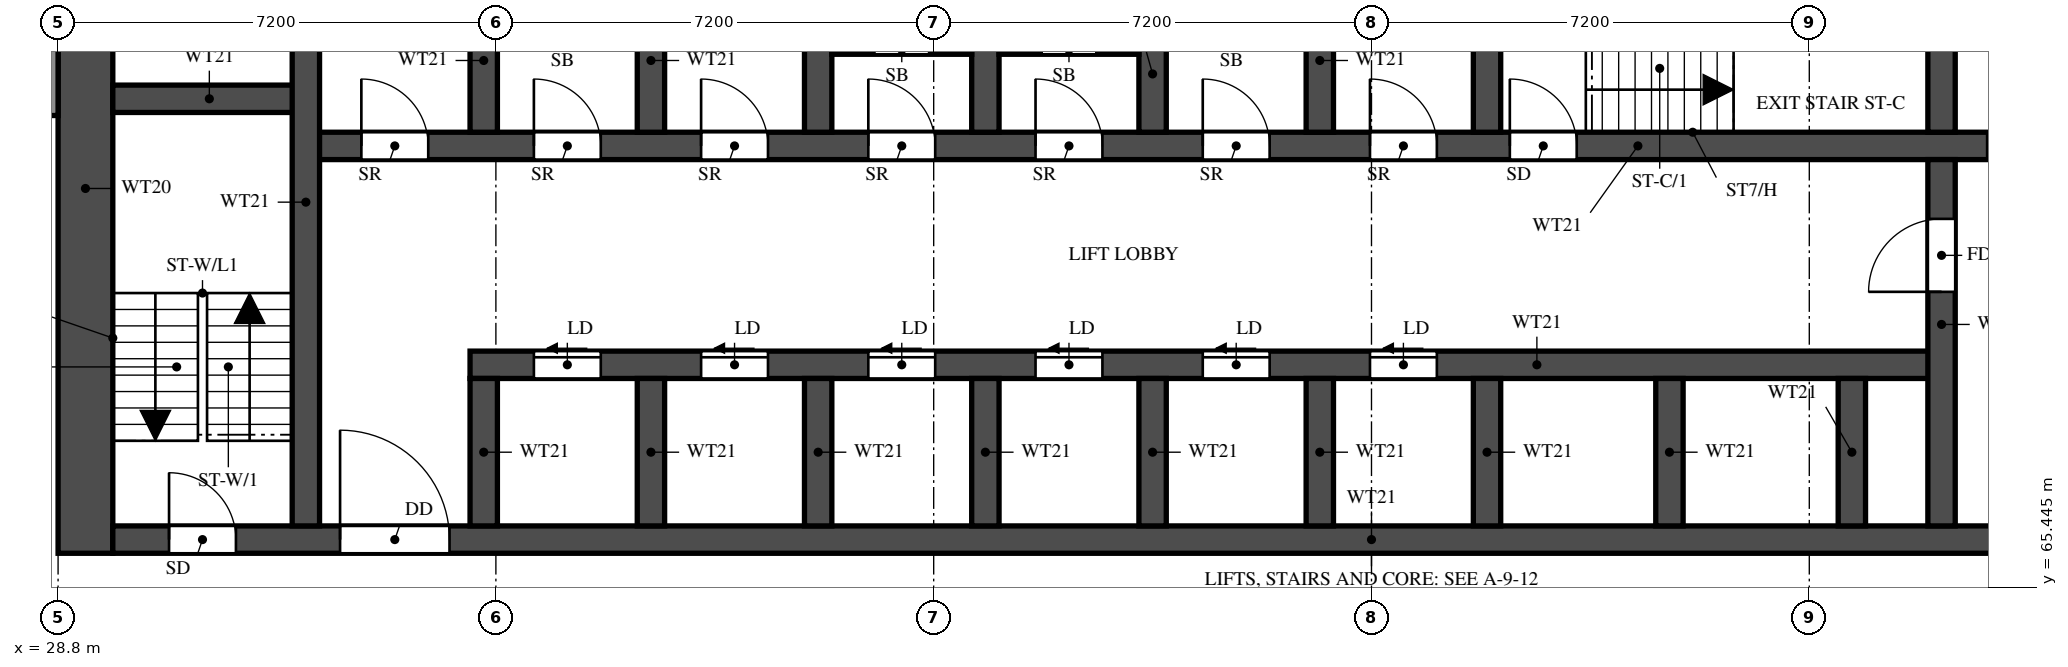
"""IFC4 building model, lengths in metres.
Left out: names, types, materials, properties, quantities, classifications, styles, units other than length and angle.
Written with IfcOpenShell. Run it as: python <this file> out.ifc"""

import sys

from ifc_helpers import new_model, si_unit, direction, frame, frame_2d, origin, place, context, subcontext, project, spatial, rectangle, extrude, element, fill, save


model = new_model("IFC4")
c1 = context("Model", 3, precision=1e-05, world=origin(), true_north=direction((0.0, 1.0)))
c2 = subcontext(c1, "Body", "Model", "MODEL_VIEW")
j1 = project(units=[si_unit("LENGTHUNIT", "METRE"), si_unit("PLANEANGLEUNIT", "RADIAN")], contexts=[c1])
p1 = place(None, origin())
s1 = spatial("IfcSite", under=j1, at=p1, CompositionType="ELEMENT")
p2 = place(p1, origin())
s2 = spatial("IfcBuilding", under=s1, at=p2, CompositionType="ELEMENT")
p3 = place(p2, frame((0.0, 0.0, 72.5)))
s3 = spatial("IfcBuildingStorey", under=s2, at=p3, CompositionType="ELEMENT", Elevation=72.5)
p4 = place(p3, frame((29.25, 66.0, 0.0), z_axis=(0.0, 0.0, 1.0), x_axis=(0.0, 1.0, 0.0)))
e1 = element("IfcWall", 1, at=p4, inside=s3, PredefinedType="SHEAR", context=c2, shape_type="SweptSolid", body=[
    extrude(rectangle(XDim=12.0, YDim=0.9, at=frame_2d((6.0, 0.0))), origin(), (0.0, 0.0, 1.0), 3.18),
])
p5 = place(p3, frame((29.7, 66.225, 0.0), z_axis=(0.0, 0.0, 1.0), x_axis=(1.0, 0.0, 0.0)))
e2 = element("IfcWall", 2, at=p5, inside=s3, PredefinedType="SHEAR", context=c2, shape_type="SweptSolid", body=[
    extrude(rectangle(XDim=41.4, YDim=0.45, at=frame_2d((20.7, 0.0))), origin(), (0.0, 0.0, 1.0), 3.18),
])
p6 = place(p5, frame((0.925, 0.0, 0.0)))
e3 = element("IfcOpeningElement", 3, at=p6, cuts=e2, PredefinedType="OPENING", context=c2, shape_type="SweptSolid", body=[
    extrude(rectangle(XDim=1.1, YDim=2.1, at=frame_2d((0.55, 1.05))), frame((0.0, 0.235, 0.0), z_axis=(0.0, -1.0, 0.0), x_axis=(1.0, 0.0, 0.0)), (0.0, 0.0, 1.0), 0.47),
])
p7 = place(p5, frame((3.738, 0.0, 0.0)))
e4 = element("IfcOpeningElement", 4, at=p7, cuts=e2, PredefinedType="OPENING", context=c2, shape_type="SweptSolid", body=[
    extrude(rectangle(XDim=1.8, YDim=2.1, at=frame_2d((0.9, 1.05))), frame((0.0, 0.235, 0.0), z_axis=(0.0, -1.0, 0.0), x_axis=(1.0, 0.0, 0.0)), (0.0, 0.0, 1.0), 0.47),
])
p8 = place(p3, frame((35.575, 69.1, 0.0), z_axis=(0.0, 0.0, 1.0), x_axis=(1.0, 0.0, 0.0)))
e5 = element("IfcWall", 5, at=p8, inside=s3, PredefinedType="SHEAR", context=c2, shape_type="SweptSolid", body=[
    extrude(rectangle(XDim=24.2, YDim=0.45, at=frame_2d((12.1, 0.0))), origin(), (0.0, 0.0, 1.0), 3.18),
])
p9 = place(p8, frame((1.05, 0.0, 0.0)))
e6 = element("IfcOpeningElement", 6, at=p9, cuts=e5, PredefinedType="OPENING", context=c2, shape_type="SweptSolid", body=[
    extrude(rectangle(XDim=1.1, YDim=2.1, at=frame_2d((0.55, 1.05))), frame((0.0, 0.235, 0.0), z_axis=(0.0, -1.0, 0.0), x_axis=(1.0, 0.0, 0.0)), (0.0, 0.0, 1.0), 0.47),
])
p10 = place(p8, frame((3.8, 0.0, 0.0)))
e7 = element("IfcOpeningElement", 7, at=p10, cuts=e5, PredefinedType="OPENING", context=c2, shape_type="SweptSolid", body=[
    extrude(rectangle(XDim=1.1, YDim=2.1, at=frame_2d((0.55, 1.05))), frame((0.0, 0.235, 0.0), z_axis=(0.0, -1.0, 0.0), x_axis=(1.0, 0.0, 0.0)), (0.0, 0.0, 1.0), 0.47),
])
p11 = place(p8, frame((6.55, 0.0, 0.0)))
e8 = element("IfcOpeningElement", 8, at=p11, cuts=e5, PredefinedType="OPENING", context=c2, shape_type="SweptSolid", body=[
    extrude(rectangle(XDim=1.1, YDim=2.1, at=frame_2d((0.55, 1.05))), frame((0.0, 0.235, 0.0), z_axis=(0.0, -1.0, 0.0), x_axis=(1.0, 0.0, 0.0)), (0.0, 0.0, 1.0), 0.47),
])
p12 = place(p8, frame((9.3, 0.0, 0.0)))
e9 = element("IfcOpeningElement", 9, at=p12, cuts=e5, PredefinedType="OPENING", context=c2, shape_type="SweptSolid", body=[
    extrude(rectangle(XDim=1.1, YDim=2.1, at=frame_2d((0.55, 1.05))), frame((0.0, 0.235, 0.0), z_axis=(0.0, -1.0, 0.0), x_axis=(1.0, 0.0, 0.0)), (0.0, 0.0, 1.0), 0.47),
])
p13 = place(p8, frame((12.05, 0.0, 0.0)))
e10 = element("IfcOpeningElement", 10, at=p13, cuts=e5, PredefinedType="OPENING", context=c2, shape_type="SweptSolid", body=[
    extrude(rectangle(XDim=1.1, YDim=2.1, at=frame_2d((0.55, 1.05))), frame((0.0, 0.235, 0.0), z_axis=(0.0, -1.0, 0.0), x_axis=(1.0, 0.0, 0.0)), (0.0, 0.0, 1.0), 0.47),
])
p14 = place(p8, frame((14.8, 0.0, 0.0)))
e11 = element("IfcOpeningElement", 11, at=p14, cuts=e5, PredefinedType="OPENING", context=c2, shape_type="SweptSolid", body=[
    extrude(rectangle(XDim=1.1, YDim=2.1, at=frame_2d((0.55, 1.05))), frame((0.0, 0.235, 0.0), z_axis=(0.0, -1.0, 0.0), x_axis=(1.0, 0.0, 0.0)), (0.0, 0.0, 1.0), 0.47),
])
p15 = place(p3, frame((32.875, 72.7, 0.0), z_axis=(0.0, 0.0, 1.0), x_axis=(1.0, 0.0, 0.0)))
e12 = element("IfcWall", 12, at=p15, inside=s3, PredefinedType="SHEAR", context=c2, shape_type="SweptSolid", body=[
    extrude(rectangle(XDim=35.05, YDim=0.45, at=frame_2d((17.525, 0.0))), origin(), (0.0, 0.0, 1.0), 3.18),
])
p16 = place(p15, frame((19.8, 0.0, 0.0)))
e13 = element("IfcOpeningElement", 13, at=p16, cuts=e12, PredefinedType="OPENING", context=c2, shape_type="SweptSolid", body=[
    extrude(rectangle(XDim=1.1, YDim=2.1, at=frame_2d((0.55, 1.05))), frame((0.0, 0.235, 0.0), z_axis=(0.0, -1.0, 0.0), x_axis=(1.0, 0.0, 0.0)), (0.0, 0.0, 1.0), 0.47),
])
p17 = place(p15, frame((27.65, 0.0, 0.0)))
e14 = element("IfcOpeningElement", 14, at=p17, cuts=e12, PredefinedType="OPENING", context=c2, shape_type="SweptSolid", body=[
    extrude(rectangle(XDim=1.1, YDim=2.1, at=frame_2d((0.55, 1.05))), frame((0.0, 0.235, 0.0), z_axis=(0.0, -1.0, 0.0), x_axis=(1.0, 0.0, 0.0)), (0.0, 0.0, 1.0), 0.47),
])
p18 = place(p15, frame((30.25, 0.0, 0.0)))
e15 = element("IfcOpeningElement", 15, at=p18, cuts=e12, PredefinedType="OPENING", context=c2, shape_type="SweptSolid", body=[
    extrude(rectangle(XDim=1.1, YDim=2.1, at=frame_2d((0.55, 1.05))), frame((0.0, 0.235, 0.0), z_axis=(0.0, -1.0, 0.0), x_axis=(1.0, 0.0, 0.0)), (0.0, 0.0, 1.0), 0.47),
])
p19 = place(p15, frame((3.75, 0.0, 0.0)))
e16 = element("IfcOpeningElement", 16, at=p19, cuts=e12, PredefinedType="OPENING", context=c2, shape_type="SweptSolid", body=[
    extrude(rectangle(XDim=1.1, YDim=2.1, at=frame_2d((0.55, 1.05))), frame((0.0, 0.235, 0.0), z_axis=(0.0, -1.0, 0.0), x_axis=(1.0, 0.0, 0.0)), (0.0, 0.0, 1.0), 0.47),
])
p20 = place(p15, frame((6.5, 0.0, 0.0)))
e17 = element("IfcOpeningElement", 17, at=p20, cuts=e12, PredefinedType="OPENING", context=c2, shape_type="SweptSolid", body=[
    extrude(rectangle(XDim=1.1, YDim=2.1, at=frame_2d((0.55, 1.05))), frame((0.0, 0.235, 0.0), z_axis=(0.0, -1.0, 0.0), x_axis=(1.0, 0.0, 0.0)), (0.0, 0.0, 1.0), 0.47),
])
p21 = place(p15, frame((9.25, 0.0, 0.0)))
e18 = element("IfcOpeningElement", 18, at=p21, cuts=e12, PredefinedType="OPENING", context=c2, shape_type="SweptSolid", body=[
    extrude(rectangle(XDim=1.1, YDim=2.1, at=frame_2d((0.55, 1.05))), frame((0.0, 0.235, 0.0), z_axis=(0.0, -1.0, 0.0), x_axis=(1.0, 0.0, 0.0)), (0.0, 0.0, 1.0), 0.47),
])
p22 = place(p15, frame((12.0, 0.0, 0.0)))
e19 = element("IfcOpeningElement", 19, at=p22, cuts=e12, PredefinedType="OPENING", context=c2, shape_type="SweptSolid", body=[
    extrude(rectangle(XDim=1.1, YDim=2.1, at=frame_2d((0.55, 1.05))), frame((0.0, 0.235, 0.0), z_axis=(0.0, -1.0, 0.0), x_axis=(1.0, 0.0, 0.0)), (0.0, 0.0, 1.0), 0.47),
])
p23 = place(p15, frame((14.75, 0.0, 0.0)))
e20 = element("IfcOpeningElement", 20, at=p23, cuts=e12, PredefinedType="OPENING", context=c2, shape_type="SweptSolid", body=[
    extrude(rectangle(XDim=1.1, YDim=2.1, at=frame_2d((0.55, 1.05))), frame((0.0, 0.235, 0.0), z_axis=(0.0, -1.0, 0.0), x_axis=(1.0, 0.0, 0.0)), (0.0, 0.0, 1.0), 0.47),
])
p24 = place(p15, frame((17.5, 0.0, 0.0)))
e21 = element("IfcOpeningElement", 21, at=p24, cuts=e12, PredefinedType="OPENING", context=c2, shape_type="SweptSolid", body=[
    extrude(rectangle(XDim=1.1, YDim=2.1, at=frame_2d((0.55, 1.05))), frame((0.0, 0.235, 0.0), z_axis=(0.0, -1.0, 0.0), x_axis=(1.0, 0.0, 0.0)), (0.0, 0.0, 1.0), 0.47),
])
p25 = place(p15, frame((0.913, 0.0, 0.0)))
e22 = element("IfcOpeningElement", 22, at=p25, cuts=e12, PredefinedType="OPENING", context=c2, shape_type="SweptSolid", body=[
    extrude(rectangle(XDim=1.1, YDim=2.1, at=frame_2d((0.55, 1.05))), frame((0.0, 0.235, 0.0), z_axis=(0.0, -1.0, 0.0), x_axis=(1.0, 0.0, 0.0)), (0.0, 0.0, 1.0), 0.47),
])
p26 = place(p3, frame((29.7, 73.475, 0.0), z_axis=(0.0, 0.0, 1.0), x_axis=(1.0, 0.0, 0.0)))
e23 = element("IfcWall", 23, at=p26, inside=s3, PredefinedType="SHEAR", context=c2, shape_type="SweptSolid", body=[
    extrude(rectangle(XDim=3.175, YDim=0.45, at=frame_2d((1.587, 0.0))), origin(), (0.0, 0.0, 1.0), 3.18),
])
p27 = place(p3, frame((32.875, 66.45, 0.0), z_axis=(0.0, 0.0, 1.0), x_axis=(0.0, 1.0, 0.0)))
e24 = element("IfcWall", 24, at=p27, inside=s3, PredefinedType="SHEAR", context=c2, shape_type="SweptSolid", body=[
    extrude(rectangle(XDim=10.65, YDim=0.45, at=frame_2d((5.325, 0.0))), origin(), (0.0, 0.0, 1.0), 3.18),
])
p28 = place(p3, frame((59.775, 66.45, 0.0), z_axis=(0.0, 0.0, 1.0), x_axis=(0.0, 1.0, 0.0)))
e25 = element("IfcWall", 25, at=p28, inside=s3, PredefinedType="SHEAR", context=c2, shape_type="SweptSolid", body=[
    extrude(rectangle(XDim=6.025, YDim=0.45, at=frame_2d((3.013, 0.0))), origin(), (0.0, 0.0, 1.0), 3.18),
])
p29 = place(p28, frame((3.85, 0.0, 0.0)))
e26 = element("IfcOpeningElement", 26, at=p29, cuts=e25, PredefinedType="OPENING", context=c2, shape_type="SweptSolid", body=[
    extrude(rectangle(XDim=1.2, YDim=2.1, at=frame_2d((0.6, 1.05))), frame((0.0, 0.235, 0.0), z_axis=(0.0, -1.0, 0.0), x_axis=(1.0, 0.0, 0.0)), (0.0, 0.0, 1.0), 0.47),
])
p30 = place(p3, frame((59.775, 72.925, 0.0), z_axis=(0.0, 0.0, 1.0), x_axis=(0.0, 1.0, 0.0)))
e27 = element("IfcWall", 27, at=p30, inside=s3, PredefinedType="SHEAR", context=c2, shape_type="SweptSolid", body=[
    extrude(rectangle(XDim=2.95, YDim=0.45, at=frame_2d((1.475, 0.0))), origin(), (0.0, 0.0, 1.0), 3.18),
])
for number, where, z_axis, x_axis in (
    (28, (35.8, 66.45, 0.0), (0.0, 0.0, 1.0), (0.0, 1.0, 0.0)),
    (29, (38.55, 66.45, 0.0), (0.0, 0.0, 1.0), (0.0, 1.0, 0.0)),
    (30, (41.3, 66.45, 0.0), (0.0, 0.0, 1.0), (0.0, 1.0, 0.0)),
    (31, (44.05, 66.45, 0.0), (0.0, 0.0, 1.0), (0.0, 1.0, 0.0)),
    (32, (46.8, 66.45, 0.0), (0.0, 0.0, 1.0), (0.0, 1.0, 0.0)),
    (33, (49.55, 66.45, 0.0), (0.0, 0.0, 1.0), (0.0, 1.0, 0.0)),
    (34, (52.3, 66.45, 0.0), (0.0, 0.0, 1.0), (0.0, 1.0, 0.0)),
    (35, (55.3, 66.45, 0.0), (0.0, 0.0, 1.0), (0.0, 1.0, 0.0)),
    (36, (58.3, 66.45, 0.0), (0.0, 0.0, 1.0), (0.0, 1.0, 0.0)),
):
    element("IfcWall", number, at=place(p3, frame(where, z_axis=z_axis, x_axis=x_axis)), inside=s3, PredefinedType="SHEAR", context=c2, shape_type="SweptSolid", body=[
        extrude(rectangle(XDim=2.425, YDim=0.45, at=frame_2d((1.212, 0.0))), origin(), (0.0, 0.0, 1.0), 3.18),
    ])
for number, where, z_axis, x_axis in (
    (37, (35.8, 72.925, 0.0), (0.0, 0.0, 1.0), (0.0, 1.0, 0.0)),
    (38, (38.55, 72.925, 0.0), (0.0, 0.0, 1.0), (0.0, 1.0, 0.0)),
    (39, (41.3, 72.925, 0.0), (0.0, 0.0, 1.0), (0.0, 1.0, 0.0)),
    (40, (44.05, 72.925, 0.0), (0.0, 0.0, 1.0), (0.0, 1.0, 0.0)),
    (41, (46.8, 72.925, 0.0), (0.0, 0.0, 1.0), (0.0, 1.0, 0.0)),
    (42, (49.55, 72.925, 0.0), (0.0, 0.0, 1.0), (0.0, 1.0, 0.0)),
    (43, (52.3, 72.925, 0.0), (0.0, 0.0, 1.0), (0.0, 1.0, 0.0)),
):
    element("IfcWall", number, at=place(p3, frame(where, z_axis=z_axis, x_axis=x_axis)), inside=s3, PredefinedType="SHEAR", context=c2, shape_type="SweptSolid", body=[
        extrude(rectangle(XDim=2.95, YDim=0.45, at=frame_2d((1.475, 0.0))), origin(), (0.0, 0.0, 1.0), 3.18),
    ])
p31 = place(p3, frame((41.525, 74.282, 0.0), z_axis=(0.0, 0.0, 1.0), x_axis=(1.0, 0.0, 0.0)))
e44 = element("IfcWall", 44, at=p31, inside=s3, PredefinedType="PARTITIONING", context=c2, shape_type="SweptSolid", body=[
    extrude(rectangle(XDim=2.3, YDim=0.15, at=frame_2d((1.15, 0.0))), origin(), (0.0, 0.0, 1.0), 3.18),
])
p32 = place(p31, frame((0.7, 0.0, 0.0)))
e45 = element("IfcOpeningElement", 45, at=p32, cuts=e44, PredefinedType="OPENING", context=c2, shape_type="SweptSolid", body=[
    extrude(rectangle(XDim=0.9, YDim=2.1, at=frame_2d((0.45, 1.05))), frame((0.0, 0.085, 0.0), z_axis=(0.0, -1.0, 0.0), x_axis=(1.0, 0.0, 0.0)), (0.0, 0.0, 1.0), 0.17),
])
p33 = place(p3, frame((44.275, 74.282, 0.0), z_axis=(0.0, 0.0, 1.0), x_axis=(1.0, 0.0, 0.0)))
e46 = element("IfcWall", 46, at=p33, inside=s3, PredefinedType="PARTITIONING", context=c2, shape_type="SweptSolid", body=[
    extrude(rectangle(XDim=2.3, YDim=0.15, at=frame_2d((1.15, 0.0))), origin(), (0.0, 0.0, 1.0), 3.18),
])
p34 = place(p33, frame((0.7, 0.0, 0.0)))
e47 = element("IfcOpeningElement", 47, at=p34, cuts=e46, PredefinedType="OPENING", context=c2, shape_type="SweptSolid", body=[
    extrude(rectangle(XDim=0.9, YDim=2.1, at=frame_2d((0.45, 1.05))), frame((0.0, 0.085, 0.0), z_axis=(0.0, -1.0, 0.0), x_axis=(1.0, 0.0, 0.0)), (0.0, 0.0, 1.0), 0.17),
])
p35 = place(p3, frame((28.7, 73.2, 0.0), z_axis=(0.0, 0.0, 1.0), x_axis=(0.0, 1.0, 0.0)))
e48 = element("IfcWall", 48, at=p35, inside=s3, PredefinedType="SOLIDWALL", context=c2, shape_type="SweptSolid", body=[
    extrude(rectangle(XDim=4.8, YDim=0.2, at=frame_2d((2.4, 0.0))), origin(), (0.0, 0.0, 1.0), 3.18),
])
p36 = place(p6, origin())
e49 = element("IfcDoor", 49, at=p36, inside=s3, OperationType="SINGLE_SWING_LEFT", PredefinedType="DOOR", context=c2, shape_type="SweptSolid", body=[
    extrude(rectangle(XDim=1.1, YDim=2.1, at=frame_2d((0.55, 1.05))), frame((0.0, 0.025, 0.0), z_axis=(0.0, -1.0, 0.0), x_axis=(1.0, 0.0, 0.0)), (0.0, 0.0, 1.0), 0.05),
])
fill(e3, e49)
p37 = place(p16, origin())
e50 = element("IfcDoor", 50, at=p37, inside=s3, OperationType="SINGLE_SWING_LEFT", PredefinedType="DOOR", context=c2, shape_type="SweptSolid", body=[
    extrude(rectangle(XDim=1.1, YDim=2.1, at=frame_2d((0.55, 1.05))), frame((0.0, 0.025, 0.0), z_axis=(0.0, -1.0, 0.0), x_axis=(1.0, 0.0, 0.0)), (0.0, 0.0, 1.0), 0.05),
])
fill(e13, e50)
p38 = place(p7, origin())
e51 = element("IfcDoor", 51, at=p38, inside=s3, OperationType="DOUBLE_DOOR_SINGLE_SWING", PredefinedType="DOOR", context=c2, shape_type="SweptSolid", body=[
    extrude(rectangle(XDim=1.8, YDim=2.1, at=frame_2d((0.9, 1.05))), frame((0.0, 0.025, 0.0), z_axis=(0.0, -1.0, 0.0), x_axis=(1.0, 0.0, 0.0)), (0.0, 0.0, 1.0), 0.05),
])
fill(e4, e51)
p39 = place(p29, origin())
e52 = element("IfcDoor", 52, at=p39, inside=s3, OperationType="SINGLE_SWING_RIGHT", PredefinedType="DOOR", context=c2, shape_type="SweptSolid", body=[
    extrude(rectangle(XDim=1.2, YDim=2.1, at=frame_2d((0.6, 1.05))), frame((0.0, 0.025, 0.0), z_axis=(0.0, -1.0, 0.0), x_axis=(1.0, 0.0, 0.0)), (0.0, 0.0, 1.0), 0.05),
])
fill(e26, e52)
p40 = place(p17, origin())
e53 = element("IfcDoor", 53, at=p40, inside=s3, OperationType="SLIDING_TO_LEFT", PredefinedType="DOOR", context=c2, shape_type="SweptSolid", body=[
    extrude(rectangle(XDim=1.1, YDim=2.1, at=frame_2d((0.55, 1.05))), frame((0.0, 0.025, 0.0), z_axis=(0.0, -1.0, 0.0), x_axis=(1.0, 0.0, 0.0)), (0.0, 0.0, 1.0), 0.05),
])
fill(e14, e53)
p41 = place(p9, origin())
e54 = element("IfcDoor", 54, at=p41, inside=s3, OperationType="SLIDING_TO_LEFT", PredefinedType="DOOR", context=c2, shape_type="SweptSolid", body=[
    extrude(rectangle(XDim=1.1, YDim=2.1, at=frame_2d((0.55, 1.05))), frame((0.0, 0.025, 0.0), z_axis=(0.0, -1.0, 0.0), x_axis=(1.0, 0.0, 0.0)), (0.0, 0.0, 1.0), 0.05),
])
fill(e6, e54)
p42 = place(p10, origin())
e55 = element("IfcDoor", 55, at=p42, inside=s3, OperationType="SLIDING_TO_LEFT", PredefinedType="DOOR", context=c2, shape_type="SweptSolid", body=[
    extrude(rectangle(XDim=1.1, YDim=2.1, at=frame_2d((0.55, 1.05))), frame((0.0, 0.025, 0.0), z_axis=(0.0, -1.0, 0.0), x_axis=(1.0, 0.0, 0.0)), (0.0, 0.0, 1.0), 0.05),
])
fill(e7, e55)
p43 = place(p11, origin())
e56 = element("IfcDoor", 56, at=p43, inside=s3, OperationType="SLIDING_TO_LEFT", PredefinedType="DOOR", context=c2, shape_type="SweptSolid", body=[
    extrude(rectangle(XDim=1.1, YDim=2.1, at=frame_2d((0.55, 1.05))), frame((0.0, 0.025, 0.0), z_axis=(0.0, -1.0, 0.0), x_axis=(1.0, 0.0, 0.0)), (0.0, 0.0, 1.0), 0.05),
])
fill(e8, e56)
p44 = place(p12, origin())
e57 = element("IfcDoor", 57, at=p44, inside=s3, OperationType="SLIDING_TO_LEFT", PredefinedType="DOOR", context=c2, shape_type="SweptSolid", body=[
    extrude(rectangle(XDim=1.1, YDim=2.1, at=frame_2d((0.55, 1.05))), frame((0.0, 0.025, 0.0), z_axis=(0.0, -1.0, 0.0), x_axis=(1.0, 0.0, 0.0)), (0.0, 0.0, 1.0), 0.05),
])
fill(e9, e57)
p45 = place(p13, origin())
e58 = element("IfcDoor", 58, at=p45, inside=s3, OperationType="SLIDING_TO_LEFT", PredefinedType="DOOR", context=c2, shape_type="SweptSolid", body=[
    extrude(rectangle(XDim=1.1, YDim=2.1, at=frame_2d((0.55, 1.05))), frame((0.0, 0.025, 0.0), z_axis=(0.0, -1.0, 0.0), x_axis=(1.0, 0.0, 0.0)), (0.0, 0.0, 1.0), 0.05),
])
fill(e10, e58)
p46 = place(p14, origin())
e59 = element("IfcDoor", 59, at=p46, inside=s3, OperationType="SLIDING_TO_LEFT", PredefinedType="DOOR", context=c2, shape_type="SweptSolid", body=[
    extrude(rectangle(XDim=1.1, YDim=2.1, at=frame_2d((0.55, 1.05))), frame((0.0, 0.025, 0.0), z_axis=(0.0, -1.0, 0.0), x_axis=(1.0, 0.0, 0.0)), (0.0, 0.0, 1.0), 0.05),
])
fill(e11, e59)
p47 = place(p19, origin())
e60 = element("IfcDoor", 60, at=p47, inside=s3, OperationType="SINGLE_SWING_LEFT", PredefinedType="DOOR", context=c2, shape_type="SweptSolid", body=[
    extrude(rectangle(XDim=1.1, YDim=2.1, at=frame_2d((0.55, 1.05))), frame((0.0, 0.025, 0.0), z_axis=(0.0, -1.0, 0.0), x_axis=(1.0, 0.0, 0.0)), (0.0, 0.0, 1.0), 0.05),
])
fill(e16, e60)
p48 = place(p20, origin())
e61 = element("IfcDoor", 61, at=p48, inside=s3, OperationType="SINGLE_SWING_LEFT", PredefinedType="DOOR", context=c2, shape_type="SweptSolid", body=[
    extrude(rectangle(XDim=1.1, YDim=2.1, at=frame_2d((0.55, 1.05))), frame((0.0, 0.025, 0.0), z_axis=(0.0, -1.0, 0.0), x_axis=(1.0, 0.0, 0.0)), (0.0, 0.0, 1.0), 0.05),
])
fill(e17, e61)
p49 = place(p21, origin())
e62 = element("IfcDoor", 62, at=p49, inside=s3, OperationType="SINGLE_SWING_LEFT", PredefinedType="DOOR", context=c2, shape_type="SweptSolid", body=[
    extrude(rectangle(XDim=1.1, YDim=2.1, at=frame_2d((0.55, 1.05))), frame((0.0, 0.025, 0.0), z_axis=(0.0, -1.0, 0.0), x_axis=(1.0, 0.0, 0.0)), (0.0, 0.0, 1.0), 0.05),
])
fill(e18, e62)
p50 = place(p22, origin())
e63 = element("IfcDoor", 63, at=p50, inside=s3, OperationType="SINGLE_SWING_LEFT", PredefinedType="DOOR", context=c2, shape_type="SweptSolid", body=[
    extrude(rectangle(XDim=1.1, YDim=2.1, at=frame_2d((0.55, 1.05))), frame((0.0, 0.025, 0.0), z_axis=(0.0, -1.0, 0.0), x_axis=(1.0, 0.0, 0.0)), (0.0, 0.0, 1.0), 0.05),
])
fill(e19, e63)
p51 = place(p23, origin())
e64 = element("IfcDoor", 64, at=p51, inside=s3, OperationType="SINGLE_SWING_LEFT", PredefinedType="DOOR", context=c2, shape_type="SweptSolid", body=[
    extrude(rectangle(XDim=1.1, YDim=2.1, at=frame_2d((0.55, 1.05))), frame((0.0, 0.025, 0.0), z_axis=(0.0, -1.0, 0.0), x_axis=(1.0, 0.0, 0.0)), (0.0, 0.0, 1.0), 0.05),
])
fill(e20, e64)
p52 = place(p24, origin())
e65 = element("IfcDoor", 65, at=p52, inside=s3, OperationType="SINGLE_SWING_LEFT", PredefinedType="DOOR", context=c2, shape_type="SweptSolid", body=[
    extrude(rectangle(XDim=1.1, YDim=2.1, at=frame_2d((0.55, 1.05))), frame((0.0, 0.025, 0.0), z_axis=(0.0, -1.0, 0.0), x_axis=(1.0, 0.0, 0.0)), (0.0, 0.0, 1.0), 0.05),
])
fill(e21, e65)
p53 = place(p25, origin())
e66 = element("IfcDoor", 66, at=p53, inside=s3, OperationType="SINGLE_SWING_LEFT", PredefinedType="DOOR", context=c2, shape_type="SweptSolid", body=[
    extrude(rectangle(XDim=1.1, YDim=2.1, at=frame_2d((0.55, 1.05))), frame((0.0, 0.025, 0.0), z_axis=(0.0, -1.0, 0.0), x_axis=(1.0, 0.0, 0.0)), (0.0, 0.0, 1.0), 0.05),
])
fill(e22, e66)
save(model, sys.argv[1])
